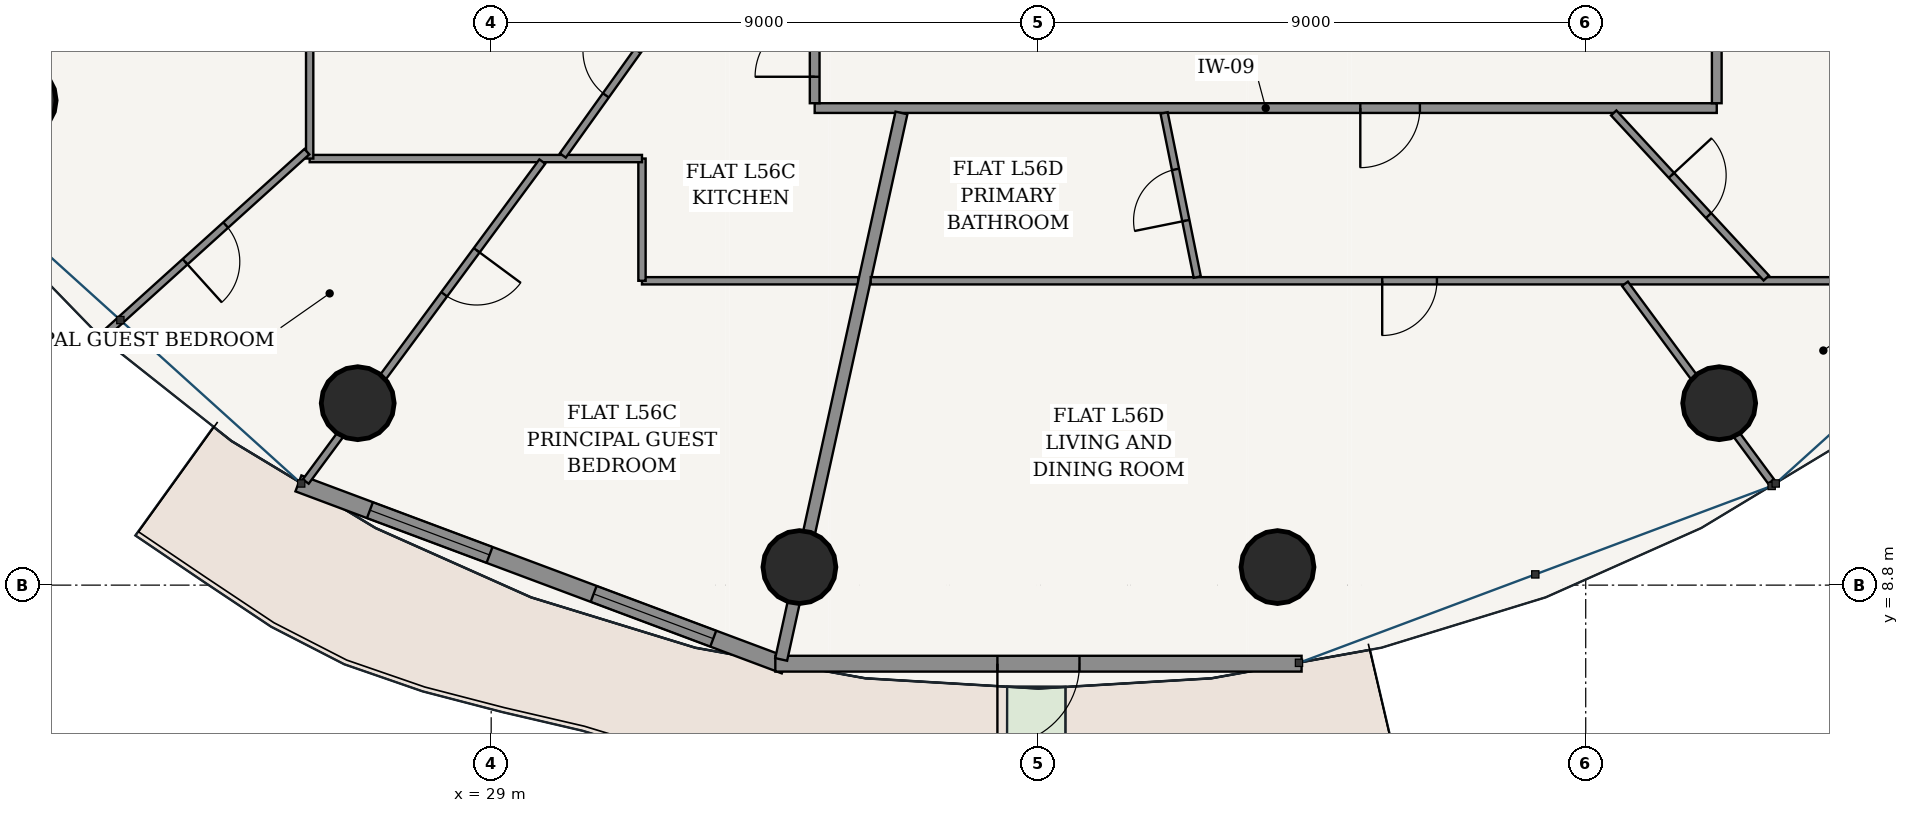
"""IFC4 building model, lengths in metres.
Left out: names, types, materials, properties, quantities, classifications, styles, units other than length and angle.
Written with IfcOpenShell. Run it as: python <this file> out.ifc"""

import sys

from ifc_helpers import new_model, si_unit, direction, frame, frame_2d, origin, origin_2d, place, context, subcontext, project, spatial, rectangle, hollow_circle, extrude, source, transform, mapped, element, fill, save


model = new_model("IFC4")
c1 = context("Model", 3, precision=1e-05, world=origin(), true_north=direction((-0.2419218956, 0.970295726276)))
c2 = subcontext(c1, "Body", "Model", "MODEL_VIEW")
j1 = project(units=[si_unit("LENGTHUNIT", "METRE"), si_unit("PLANEANGLEUNIT", "RADIAN")], contexts=[c1])
p1 = place(None, origin())
s1 = spatial("IfcSite", under=j1, at=p1, CompositionType="ELEMENT")
p2 = place(p1, origin())
s2 = spatial("IfcBuilding", under=s1, at=p2, CompositionType="ELEMENT")
p3 = place(p2, frame((0.0, 0.0, 213.4)))
s3 = spatial("IfcBuildingStorey", under=s2, at=p3, CompositionType="ELEMENT", Elevation=213.4)
for number, where, z_axis, x_axis in (
    (1, (21.246, 16.772, 0.0), (0.0, 0.0, 1.0), (1.0, 0.0, 0.0)),
    (2, (26.805, 11.792, 0.0), (0.0, 0.0, 1.0), (1.0, 0.0, 0.0)),
    (3, (34.069, 9.097, 0.0), (0.0, 0.0, 1.0), (1.0, 0.0, 0.0)),
    (4, (41.931, 9.097, 0.0), (0.0, 0.0, 1.0), (1.0, 0.0, 0.0)),
    (5, (49.195, 11.792, 0.0), (0.0, 0.0, 1.0), (1.0, 0.0, 0.0)),
):
    element("IfcColumn", number, at=place(p3, frame(where, z_axis=z_axis, x_axis=x_axis)), inside=s3, PredefinedType="COLUMN", context=c2, shape_type="SweptSolid", body=[
        extrude(hollow_circle(Radius=0.6, WallThickness=0.038, at=origin_2d()), origin(), (0.0, 0.0, 1.0), 3.7),
    ])
p4 = place(p3, frame((25.83, 10.473, 0.0), z_axis=(0.0, 0.0, 1.0), x_axis=(0.936556918375, -0.350515532672, 0.0)))
e6 = element("IfcWall", 6, at=p4, inside=s3, PredefinedType="SOLIDWALL", context=c2, shape_type="SweptSolid", body=[
    extrude(rectangle(XDim=8.539, YDim=0.28, at=frame_2d((4.27, 0.0))), origin(), (0.0, 0.0, 1.0), 3.435),
])
p5 = place(p4, frame((1.256, 0.0, 0.85)))
e7 = element("IfcOpeningElement", 7, at=p5, cuts=e6, PredefinedType="OPENING", context=c2, shape_type="SweptSolid", body=[
    extrude(rectangle(XDim=2.1, YDim=1.95, at=frame_2d((1.05, 0.975))), frame((0.0, 0.15, 0.0), z_axis=(0.0, -1.0, 0.0), x_axis=(1.0, 0.0, 0.0)), (0.0, 0.0, 1.0), 0.3),
])
p6 = place(p4, frame((5.184, 0.0, 0.85)))
e8 = element("IfcOpeningElement", 8, at=p6, cuts=e6, PredefinedType="OPENING", context=c2, shape_type="SweptSolid", body=[
    extrude(rectangle(XDim=2.1, YDim=1.95, at=frame_2d((1.05, 0.975))), frame((0.0, 0.15, 0.0), z_axis=(0.0, -1.0, 0.0), x_axis=(1.0, 0.0, 0.0)), (0.0, 0.0, 1.0), 0.3),
])
p7 = place(p3, frame((33.673, 7.508, 0.0), z_axis=(0.0, 0.0, 1.0), x_axis=(1.0, 0.0, 0.0)))
e9 = element("IfcWall", 9, at=p7, inside=s3, PredefinedType="SOLIDWALL", context=c2, shape_type="SweptSolid", body=[
    extrude(rectangle(XDim=8.654, YDim=0.26, at=frame_2d((4.327, 0.0))), origin(), (0.0, 0.0, 1.0), 3.435),
])
p8 = place(p7, frame((3.652, 0.0, 0.0)))
e10 = element("IfcOpeningElement", 10, at=p8, cuts=e9, PredefinedType="OPENING", context=c2, shape_type="SweptSolid", body=[
    extrude(rectangle(XDim=1.35, YDim=2.2, at=frame_2d((0.675, 1.1))), frame((0.0, 0.14, 0.0), z_axis=(0.0, -1.0, 0.0), x_axis=(1.0, 0.0, 0.0)), (0.0, 0.0, 1.0), 0.28),
])
p9 = place(p3, frame((34.32, 16.645, 0.0), z_axis=(0.0, 0.0, 1.0), x_axis=(1.0, 0.0, 0.0)))
e11 = element("IfcWall", 11, at=p9, inside=s3, PredefinedType="PARTITIONING", context=c2, shape_type="SweptSolid", body=[
    extrude(rectangle(XDim=14.835, YDim=0.16, at=frame_2d((7.417, 0.0))), origin(), (0.0, 0.0, 1.0), 2.951),
])
p10 = place(p9, frame((8.973, 0.0, 0.0)))
e12 = element("IfcOpeningElement", 12, at=p10, cuts=e11, PredefinedType="OPENING", context=c2, shape_type="SweptSolid", body=[
    extrude(rectangle(XDim=0.98, YDim=2.2, at=frame_2d((0.49, 1.1))), frame((0.0, 0.09, 0.0), z_axis=(0.0, -1.0, 0.0), x_axis=(1.0, 0.0, 0.0)), (0.0, 0.0, 1.0), 0.18),
])
p11 = place(p3, frame((34.32, 16.725, 0.0), z_axis=(0.0, 0.0, 1.0), x_axis=(0.0, 1.0, 0.0)))
e13 = element("IfcWall", 13, at=p11, inside=s3, PredefinedType="PARTITIONING", context=c2, shape_type="SweptSolid", body=[
    extrude(rectangle(XDim=1.85, YDim=0.16, at=frame_2d((0.925, 0.0))), origin(), (0.0, 0.0, 1.0), 3.435),
])
p12 = place(p11, frame((0.435, 0.0, 0.0)))
e14 = element("IfcOpeningElement", 14, at=p12, cuts=e13, PredefinedType="OPENING", context=c2, shape_type="SweptSolid", body=[
    extrude(rectangle(XDim=0.98, YDim=2.2, at=frame_2d((0.49, 1.1))), frame((0.0, 0.09, 0.0), z_axis=(0.0, -1.0, 0.0), x_axis=(1.0, 0.0, 0.0)), (0.0, 0.0, 1.0), 0.18),
])
p13 = place(p3, frame((49.155, 16.725, 0.0), z_axis=(0.0, 0.0, 1.0), x_axis=(0.0, 1.0, 0.0)))
e15 = element("IfcWall", 15, at=p13, inside=s3, PredefinedType="PARTITIONING", context=c2, shape_type="SweptSolid", body=[
    extrude(rectangle(XDim=18.3, YDim=0.16, at=frame_2d((9.15, 0.0))), origin(), (0.0, 0.0, 1.0), 2.951),
])
p14 = place(p13, frame((15.837, 0.0, 0.0)))
e16 = element("IfcOpeningElement", 16, at=p14, cuts=e15, PredefinedType="OPENING", context=c2, shape_type="SweptSolid", body=[
    extrude(rectangle(XDim=0.98, YDim=2.2, at=frame_2d((0.49, 1.1))), frame((0.0, 0.09, 0.0), z_axis=(0.0, -1.0, 0.0), x_axis=(1.0, 0.0, 0.0)), (0.0, 0.0, 1.0), 0.18),
])
p15 = place(p3, frame((35.038, 13.805, 0.0), z_axis=(0.0, 0.0, 1.0), x_axis=(-1.0, 0.0, 0.0)))
e17 = element("IfcWall", 17, at=p15, inside=s3, PredefinedType="PARTITIONING", context=c2, shape_type="SweptSolid", body=[
    extrude(rectangle(XDim=3.558, YDim=0.12, at=frame_2d((1.779, 0.0))), origin(), (0.0, 0.0, 1.0), 2.951),
])
p16 = place(p3, frame((31.48, 13.805, 0.0), z_axis=(0.0, 0.0, 1.0), x_axis=(0.0, 1.0, 0.0)))
e18 = element("IfcWall", 18, at=p16, inside=s3, PredefinedType="PARTITIONING", context=c2, shape_type="SweptSolid", body=[
    extrude(rectangle(XDim=2.01, YDim=0.12, at=frame_2d((1.005, 0.0))), origin(), (0.0, 0.0, 1.0), 3.11),
])
p17 = place(p3, frame((31.48, 15.815, 0.0), z_axis=(0.0, 0.0, 1.0), x_axis=(-1.0, 0.0, 0.0)))
e19 = element("IfcWall", 19, at=p17, inside=s3, PredefinedType="PARTITIONING", context=c2, shape_type="SweptSolid", body=[
    extrude(rectangle(XDim=5.465, YDim=0.12, at=frame_2d((2.732, 0.0))), origin(), (0.0, 0.0, 1.0), 2.951),
])
p18 = place(p3, frame((26.015, 15.815, 0.0), z_axis=(0.0, 0.0, 1.0), x_axis=(0.0, 1.0, 0.0)))
e20 = element("IfcWall", 20, at=p18, inside=s3, PredefinedType="PARTITIONING", context=c2, shape_type="SweptSolid", body=[
    extrude(rectangle(XDim=5.665, YDim=0.12, at=frame_2d((2.833, 0.0))), origin(), (0.0, 0.0, 1.0), 2.951),
])
p19 = place(p18, frame((2.383, 0.0, 0.0)))
e21 = element("IfcOpeningElement", 21, at=p19, cuts=e20, PredefinedType="OPENING", context=c2, shape_type="SweptSolid", body=[
    extrude(rectangle(XDim=0.9, YDim=2.15, at=frame_2d((0.45, 1.075))), frame((0.0, 0.07, 0.0), z_axis=(0.0, -1.0, 0.0), x_axis=(1.0, 0.0, 0.0)), (0.0, 0.0, 1.0), 0.14),
])
p20 = place(p3, frame((25.969, 15.928, 0.0), z_axis=(0.0, 0.0, 1.0), x_axis=(-0.741935446671, -0.670471321514, 0.0)))
e22 = element("IfcWall", 22, at=p20, inside=s3, PredefinedType="PARTITIONING", context=c2, shape_type="SweptSolid", body=[
    extrude(rectangle(XDim=4.499, YDim=0.12, at=frame_2d((2.25, 0.0))), origin(), (0.0, 0.0, 1.0), 2.951),
])
p21 = place(p20, frame((1.8, 0.0, 0.0)))
e23 = element("IfcOpeningElement", 23, at=p21, cuts=e22, PredefinedType="OPENING", context=c2, shape_type="SweptSolid", body=[
    extrude(rectangle(XDim=0.9, YDim=2.15, at=frame_2d((0.45, 1.075))), frame((0.0, 0.07, 0.0), z_axis=(0.0, -1.0, 0.0), x_axis=(1.0, 0.0, 0.0)), (0.0, 0.0, 1.0), 0.14),
])
p22 = place(p3, frame((29.841, 15.765, 0.0), z_axis=(0.0, 0.0, 1.0), x_axis=(-0.594535821787, -0.804069124275, 0.0)))
e24 = element("IfcWall", 24, at=p22, inside=s3, PredefinedType="PARTITIONING", context=c2, shape_type="SweptSolid", body=[
    extrude(rectangle(XDim=6.543, YDim=0.12, at=frame_2d((3.272, 0.0))), origin(), (0.0, 0.0, 1.0), 2.951),
])
p23 = place(p22, frame((1.814, 0.0, 0.0)))
e25 = element("IfcOpeningElement", 25, at=p23, cuts=e24, PredefinedType="OPENING", context=c2, shape_type="SweptSolid", body=[
    extrude(rectangle(XDim=0.9, YDim=2.15, at=frame_2d((0.45, 1.075))), frame((0.0, 0.07, 0.0), z_axis=(0.0, -1.0, 0.0), x_axis=(1.0, 0.0, 0.0)), (0.0, 0.0, 1.0), 0.14),
])
p24 = place(p3, frame((32.117, 18.575, 0.0), z_axis=(0.0, 0.0, 1.0), x_axis=(-0.581813438478, -0.813322274874, 0.0)))
e26 = element("IfcWall", 26, at=p24, inside=s3, PredefinedType="PARTITIONING", context=c2, shape_type="SweptSolid", body=[
    extrude(rectangle(XDim=3.331, YDim=0.12, at=frame_2d((1.666, 0.0))), origin(), (0.0, 0.0, 1.0), 3.435),
])
p25 = place(p24, frame((1.216, 0.0, 0.0)))
e27 = element("IfcOpeningElement", 27, at=p25, cuts=e26, PredefinedType="OPENING", context=c2, shape_type="SweptSolid", body=[
    extrude(rectangle(XDim=0.9, YDim=2.15, at=frame_2d((0.45, 1.075))), frame((0.0, 0.07, 0.0), z_axis=(0.0, -1.0, 0.0), x_axis=(1.0, 0.0, 0.0)), (0.0, 0.0, 1.0), 0.14),
])
p26 = place(p3, frame((35.747, 16.565, 0.0), z_axis=(0.0, 0.0, 1.0), x_axis=(-0.214957946814, -0.976623305631, 0.0)))
e28 = element("IfcWall", 28, at=p26, inside=s3, PredefinedType="PARTITIONING", context=c2, shape_type="SweptSolid", body=[
    extrude(rectangle(XDim=9.202, YDim=0.2, at=frame_2d((4.601, 0.0))), origin(), (0.0, 0.0, 1.0), 2.951),
])
p27 = place(p3, frame((51.995, 13.805, 0.0), z_axis=(0.0, 0.0, 1.0), x_axis=(-1.0, 0.0, 0.0)))
e29 = element("IfcWall", 29, at=p27, inside=s3, PredefinedType="PARTITIONING", context=c2, shape_type="SweptSolid", body=[
    extrude(rectangle(XDim=16.753, YDim=0.12, at=frame_2d((8.377, 0.0))), origin(), (0.0, 0.0, 1.0), 2.951),
])
p28 = place(p27, frame((7.442, 0.0, 0.0)))
e30 = element("IfcOpeningElement", 30, at=p28, cuts=e29, PredefinedType="OPENING", context=c2, shape_type="SweptSolid", body=[
    extrude(rectangle(XDim=0.9, YDim=2.15, at=frame_2d((0.45, 1.075))), frame((0.0, 0.07, 0.0), z_axis=(0.0, -1.0, 0.0), x_axis=(1.0, 0.0, 0.0)), (0.0, 0.0, 1.0), 0.14),
])
p29 = place(p3, frame((47.646, 13.755, 0.0), z_axis=(0.0, 0.0, 1.0), x_axis=(0.594518373783, -0.80408202519, 0.0)))
e31 = element("IfcWall", 31, at=p29, inside=s3, PredefinedType="PARTITIONING", context=c2, shape_type="SweptSolid", body=[
    extrude(rectangle(XDim=4.044, YDim=0.12, at=frame_2d((2.022, 0.0))), origin(), (0.0, 0.0, 1.0), 2.951),
])
p30 = place(p3, frame((40.066, 16.565, 0.0), z_axis=(0.0, 0.0, 1.0), x_axis=(0.197974199315, -0.980207231358, 0.0)))
e32 = element("IfcWall", 32, at=p30, inside=s3, PredefinedType="PARTITIONING", context=c2, shape_type="SweptSolid", body=[
    extrude(rectangle(XDim=2.754, YDim=0.12, at=frame_2d((1.377, 0.0))), origin(), (0.0, 0.0, 1.0), 3.11),
])
p31 = place(p30, frame((0.947, 0.0, 0.0)))
e33 = element("IfcOpeningElement", 33, at=p31, cuts=e32, PredefinedType="OPENING", context=c2, shape_type="SweptSolid", body=[
    extrude(rectangle(XDim=0.86, YDim=2.15, at=frame_2d((0.43, 1.075))), frame((0.0, 0.07, 0.0), z_axis=(0.0, -1.0, 0.0), x_axis=(1.0, 0.0, 0.0)), (0.0, 0.0, 1.0), 0.14),
])
p32 = place(p3, frame((47.46, 16.565, 0.0), z_axis=(0.0, 0.0, 1.0), x_axis=(0.678787443458, -0.734334805524, 0.0)))
e34 = element("IfcWall", 34, at=p32, inside=s3, PredefinedType="PARTITIONING", context=c2, shape_type="SweptSolid", body=[
    extrude(rectangle(XDim=3.696, YDim=0.12, at=frame_2d((1.848, 0.0))), origin(), (0.0, 0.0, 1.0), 2.951),
])
p33 = place(p32, frame((1.398, 0.0, 0.0)))
e35 = element("IfcOpeningElement", 35, at=p33, cuts=e34, PredefinedType="OPENING", context=c2, shape_type="SweptSolid", body=[
    extrude(rectangle(XDim=0.9, YDim=2.15, at=frame_2d((0.45, 1.075))), frame((0.0, 0.07, 0.0), z_axis=(0.0, -1.0, 0.0), x_axis=(1.0, 0.0, 0.0)), (0.0, 0.0, 1.0), 0.14),
])
m1 = source(origin(), c2, "Body", "SweptSolid", [
    extrude(rectangle(XDim=2.1, YDim=1.95, at=frame_2d((1.05, 0.975))), frame((0.0, 0.03, 0.0), z_axis=(0.0, -1.0, 0.0), x_axis=(1.0, 0.0, 0.0)), (0.0, 0.0, 1.0), 0.06),
])
p34 = place(p5, origin())
e36 = element("IfcWindow", 36, at=p34, inside=s3, PartitioningType="SINGLE_PANEL", PredefinedType="WINDOW", context=c2, shape_type="MappedRepresentation", body=[
    mapped(m1, transform((0.0, 0.0, 0.0), scale=1.0)),
])
fill(e7, e36)
p35 = place(p6, origin())
e37 = element("IfcWindow", 37, at=p35, inside=s3, PartitioningType="SINGLE_PANEL", PredefinedType="WINDOW", context=c2, shape_type="MappedRepresentation", body=[
    mapped(m1, transform((0.0, 0.0, 0.0), scale=1.0)),
])
fill(e8, e37)
m2 = source(origin(), c2, "Body", "SweptSolid", [
    extrude(rectangle(XDim=1.35, YDim=2.2, at=frame_2d((0.675, 1.1))), frame((0.0, 0.025, 0.0), z_axis=(0.0, -1.0, 0.0), x_axis=(1.0, 0.0, 0.0)), (0.0, 0.0, 1.0), 0.05),
])
p36 = place(p8, frame((1.35, 0.0, 0.0), z_axis=(0.0, 0.0, 1.0), x_axis=(-1.0, 0.0, 0.0)))
e38 = element("IfcDoor", 38, at=p36, inside=s3, OperationType="SINGLE_SWING_RIGHT", PredefinedType="DOOR", context=c2, shape_type="MappedRepresentation", body=[
    mapped(m2, transform((0.0, 0.0, 0.0), scale=1.0)),
])
fill(e10, e38)
m3 = source(origin(), c2, "Body", "SweptSolid", [
    extrude(rectangle(XDim=0.98, YDim=2.2, at=frame_2d((0.49, 1.1))), frame((0.0, 0.025, 0.0), z_axis=(0.0, -1.0, 0.0), x_axis=(1.0, 0.0, 0.0)), (0.0, 0.0, 1.0), 0.05),
])
p37 = place(p12, origin())
e39 = element("IfcDoor", 39, at=p37, inside=s3, OperationType="SINGLE_SWING_LEFT", PredefinedType="DOOR", context=c2, shape_type="MappedRepresentation", body=[
    mapped(m3, transform((0.0, 0.0, 0.0), scale=1.0)),
])
fill(e14, e39)
m4 = source(origin(), c2, "Body", "SweptSolid", [
    extrude(rectangle(XDim=0.9, YDim=2.15, at=frame_2d((0.45, 1.075))), frame((0.0, 0.025, 0.0), z_axis=(0.0, -1.0, 0.0), x_axis=(1.0, 0.0, 0.0)), (0.0, 0.0, 1.0), 0.05),
])
p38 = place(p25, frame((0.9, 0.0, 0.0), z_axis=(0.0, 0.0, 1.0), x_axis=(-1.0, 0.0, 0.0)))
e40 = element("IfcDoor", 40, at=p38, inside=s3, OperationType="SINGLE_SWING_RIGHT", PredefinedType="DOOR", context=c2, shape_type="MappedRepresentation", body=[
    mapped(m4, transform((0.0, 0.0, 0.0), scale=1.0)),
])
fill(e27, e40)
p39 = place(p21, origin())
e41 = element("IfcDoor", 41, at=p39, inside=s3, OperationType="SINGLE_SWING_RIGHT", PredefinedType="DOOR", context=c2, shape_type="MappedRepresentation", body=[
    mapped(m4, transform((0.0, 0.0, 0.0), scale=1.0)),
])
fill(e23, e41)
p40 = place(p23, origin())
e42 = element("IfcDoor", 42, at=p40, inside=s3, OperationType="SINGLE_SWING_LEFT", PredefinedType="DOOR", context=c2, shape_type="MappedRepresentation", body=[
    mapped(m4, transform((0.0, 0.0, 0.0), scale=1.0)),
])
fill(e25, e42)
p41 = place(p10, frame((0.98, 0.0, 0.0), z_axis=(0.0, 0.0, 1.0), x_axis=(-1.0, 0.0, 0.0)))
e43 = element("IfcDoor", 43, at=p41, inside=s3, OperationType="SINGLE_SWING_RIGHT", PredefinedType="DOOR", context=c2, shape_type="MappedRepresentation", body=[
    mapped(m3, transform((0.0, 0.0, 0.0), scale=1.0)),
])
fill(e12, e43)
m5 = source(origin(), c2, "Body", "SweptSolid", [
    extrude(rectangle(XDim=0.86, YDim=2.15, at=frame_2d((0.43, 1.075))), frame((0.0, 0.025, 0.0), z_axis=(0.0, -1.0, 0.0), x_axis=(1.0, 0.0, 0.0)), (0.0, 0.0, 1.0), 0.05),
])
p42 = place(p31, frame((0.86, 0.0, 0.0), z_axis=(0.0, 0.0, 1.0), x_axis=(-1.0, 0.0, 0.0)))
e44 = element("IfcDoor", 44, at=p42, inside=s3, OperationType="SINGLE_SWING_LEFT", PredefinedType="DOOR", context=c2, shape_type="MappedRepresentation", body=[
    mapped(m5, transform((0.0, 0.0, 0.0), scale=1.0)),
])
fill(e33, e44)
p43 = place(p28, origin())
e45 = element("IfcDoor", 45, at=p43, inside=s3, OperationType="SINGLE_SWING_RIGHT", PredefinedType="DOOR", context=c2, shape_type="MappedRepresentation", body=[
    mapped(m4, transform((0.0, 0.0, 0.0), scale=1.0)),
])
fill(e30, e45)
p44 = place(p33, origin())
e46 = element("IfcDoor", 46, at=p44, inside=s3, OperationType="SINGLE_SWING_LEFT", PredefinedType="DOOR", context=c2, shape_type="MappedRepresentation", body=[
    mapped(m4, transform((0.0, 0.0, 0.0), scale=1.0)),
])
fill(e35, e46)
save(model, sys.argv[1])
